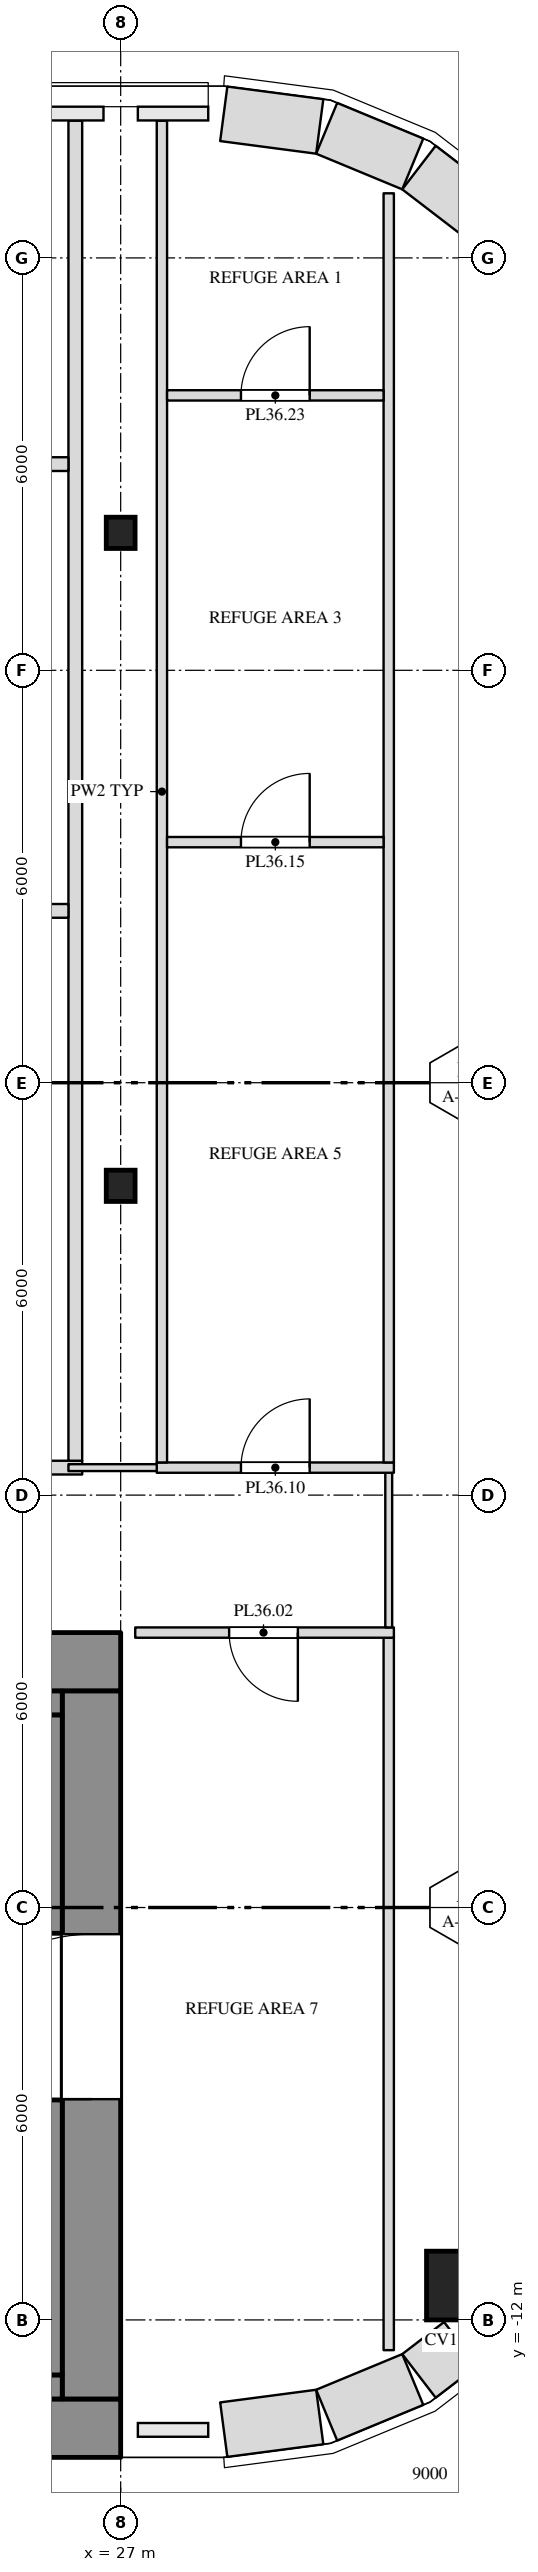
"""IFC4 building model, lengths in metres.
Left out: names, types, materials, properties, quantities, classifications, styles, units other than length and angle.
Written with IfcOpenShell. Run it as: python <this file> out.ifc"""

import sys

from ifc_helpers import new_model, si_unit, direction, frame, frame_2d, origin, origin_2d, place, context, subcontext, project, spatial, rectangle, i_section, extrude, element, fill, save


model = new_model("IFC4")
c1 = context("Model", 3, precision=1e-05, world=origin(), true_north=direction((0.0, 1.0)))
c2 = subcontext(c1, "Body", "Model", "MODEL_VIEW")
j1 = project(units=[si_unit("LENGTHUNIT", "METRE"), si_unit("PLANEANGLEUNIT", "RADIAN")], contexts=[c1])
p1 = place(None, origin())
s1 = spatial("IfcSite", under=j1, at=p1, CompositionType="ELEMENT")
p2 = place(p1, origin())
s2 = spatial("IfcBuilding", under=s1, at=p2, CompositionType="ELEMENT")
p3 = place(p2, frame((0.0, 0.0, 160.5)))
s3 = spatial("IfcBuildingStorey", under=s2, at=p3, CompositionType="ELEMENT", Elevation=160.5)
p4 = place(p3, frame((31.95, -11.5, 0.0), z_axis=(0.0, 0.0, 1.0), x_axis=(1.0, 0.0, 0.0)))
e1 = element("IfcColumn", 1, at=p4, inside=s3, PredefinedType="COLUMN", context=c2, shape_type="SweptSolid", body=[
    extrude(rectangle(XDim=1.0, YDim=1.0, at=origin_2d()), origin(), (0.0, 0.0, 1.0), 4.0),
])
for number, where, z_axis, x_axis in (
    (2, (27.0, 4.5, 0.0), (0.0, 0.0, 1.0), (1.0, 0.0, 0.0)),
    (3, (27.0, 14.0, 0.0), (0.0, 0.0, 1.0), (1.0, 0.0, 0.0)),
):
    element("IfcColumn", number, at=place(p3, frame(where, z_axis=z_axis, x_axis=x_axis)), inside=s3, PredefinedType="COLUMN", context=c2, shape_type="SweptSolid", body=[
        extrude(i_section(OverallWidth=0.419, OverallDepth=0.455, WebThickness=0.042, FlangeThickness=0.068, at=origin_2d()), origin(), (0.0, 0.0, 1.0), 4.0),
    ])
p5 = place(p3, frame((-27.0, -2.425, 0.0), z_axis=(0.0, 0.0, 1.0), x_axis=(1.0, 0.0, 0.0)))
e4 = element("IfcWall", 4, at=p5, inside=s3, PredefinedType="SHEAR", context=c2, shape_type="SweptSolid", body=[
    extrude(rectangle(XDim=54.0, YDim=0.85, at=frame_2d((27.0, 0.0))), origin(), (0.0, 0.0, 1.0), 3.8),
])
p6 = place(p5, frame((15.15, 0.0, 0.0)))
e5 = element("IfcOpeningElement", 5, at=p6, cuts=e4, PredefinedType="OPENING", context=c2, shape_type="SweptSolid", body=[
    extrude(rectangle(XDim=2.4, YDim=2.1, at=frame_2d((1.2, 1.05))), frame((0.0, 0.437, 0.0), z_axis=(0.0, -1.0, 0.0), x_axis=(1.0, 0.0, 0.0)), (0.0, 0.0, 1.0), 0.874),
])
p7 = place(p5, frame((36.45, 0.0, 0.0)))
e6 = element("IfcOpeningElement", 6, at=p7, cuts=e4, PredefinedType="OPENING", context=c2, shape_type="SweptSolid", body=[
    extrude(rectangle(XDim=2.4, YDim=2.1, at=frame_2d((1.2, 1.05))), frame((0.0, 0.437, 0.0), z_axis=(0.0, -1.0, 0.0), x_axis=(1.0, 0.0, 0.0)), (0.0, 0.0, 1.0), 0.874),
])
p8 = place(p3, frame((-27.0, -13.575, 0.0), z_axis=(0.0, 0.0, 1.0), x_axis=(1.0, 0.0, 0.0)))
e7 = element("IfcWall", 7, at=p8, inside=s3, PredefinedType="SHEAR", context=c2, shape_type="SweptSolid", body=[
    extrude(rectangle(XDim=54.0, YDim=0.85, at=frame_2d((27.0, 0.0))), origin(), (0.0, 0.0, 1.0), 3.8),
])
p9 = place(p3, frame((26.575, -13.15, 0.0), z_axis=(0.0, 0.0, 1.0), x_axis=(0.0, 1.0, 0.0)))
e8 = element("IfcWall", 8, at=p9, inside=s3, PredefinedType="SHEAR", context=c2, shape_type="SweptSolid", body=[
    extrude(rectangle(XDim=10.3, YDim=0.85, at=frame_2d((5.15, 0.0))), origin(), (0.0, 0.0, 1.0), 3.8),
])
p10 = place(p9, frame((4.362, 0.0, 0.0)))
e9 = element("IfcOpeningElement", 9, at=p10, cuts=e8, PredefinedType="OPENING", context=c2, shape_type="SweptSolid", body=[
    extrude(rectangle(XDim=2.4, YDim=2.1, at=frame_2d((1.2, 1.05))), frame((0.0, 0.437, 0.0), z_axis=(0.0, -1.0, 0.0), x_axis=(1.0, 0.0, 0.0)), (0.0, 0.0, 1.0), 0.874),
])
p11 = place(p3, frame((12.0, -3.025, 0.0), z_axis=(0.0, 0.0, 1.0), x_axis=(1.0, 0.0, 0.0)))
e10 = element("IfcWall", 10, at=p11, inside=s3, PredefinedType="SHEAR", context=c2, shape_type="SweptSolid", body=[
    extrude(rectangle(XDim=14.15, YDim=0.35, at=frame_2d((7.075, 0.0))), origin(), (0.0, 0.0, 1.0), 3.8),
])
p12 = place(p3, frame((-26.15, -12.975, 0.0), z_axis=(0.0, 0.0, 1.0), x_axis=(1.0, 0.0, 0.0)))
e11 = element("IfcWall", 11, at=p12, inside=s3, PredefinedType="SHEAR", context=c2, shape_type="SweptSolid", body=[
    extrude(rectangle(XDim=52.3, YDim=0.35, at=frame_2d((26.15, 0.0))), origin(), (0.0, 0.0, 1.0), 3.8),
])
p13 = place(p3, frame((25.975, -12.8, 0.0), z_axis=(0.0, 0.0, 1.0), x_axis=(0.0, 1.0, 0.0)))
e12 = element("IfcWall", 12, at=p13, inside=s3, PredefinedType="SHEAR", context=c2, shape_type="SweptSolid", body=[
    extrude(rectangle(XDim=4.0, YDim=0.35, at=frame_2d((2.0, 0.0))), origin(), (0.0, 0.0, 1.0), 3.8),
])
p14 = place(p3, frame((25.975, -6.375, 0.0), z_axis=(0.0, 0.0, 1.0), x_axis=(0.0, 1.0, 0.0)))
e13 = element("IfcWall", 13, at=p14, inside=s3, PredefinedType="SHEAR", context=c2, shape_type="SweptSolid", body=[
    extrude(rectangle(XDim=3.175, YDim=0.35, at=frame_2d((1.587, 0.0))), origin(), (0.0, 0.0, 1.0), 3.8),
])
p15 = place(p3, frame((30.9, -12.44, 0.0), z_axis=(0.0, 0.0, 1.0), x_axis=(0.0, 1.0, 0.0)))
e14 = element("IfcWall", 14, at=p15, inside=s3, PredefinedType="PARTITIONING", context=c2, shape_type="SweptSolid", body=[
    extrude(rectangle(XDim=10.365, YDim=0.15, at=frame_2d((5.183, 0.0))), origin(), (0.0, 0.0, 1.0), 3.8),
])
p16 = place(p3, frame((27.212, -2.0, 0.0), z_axis=(0.0, 0.0, 1.0), x_axis=(1.0, 0.0, 0.0)))
e15 = element("IfcWall", 15, at=p16, inside=s3, PredefinedType="PARTITIONING", context=c2, shape_type="SweptSolid", body=[
    extrude(rectangle(XDim=3.763, YDim=0.15, at=frame_2d((1.882, 0.0))), origin(), (0.0, 0.0, 1.0), 3.8),
])
p17 = place(p16, frame((1.366, 0.0, 0.0)))
e16 = element("IfcOpeningElement", 16, at=p17, cuts=e15, PredefinedType="OPENING", context=c2, shape_type="SweptSolid", body=[
    extrude(rectangle(XDim=1.0, YDim=2.1, at=frame_2d((0.5, 1.05))), frame((0.0, 0.087, 0.0), z_axis=(0.0, -1.0, 0.0), x_axis=(1.0, 0.0, 0.0)), (0.0, 0.0, 1.0), 0.174),
])
p18 = place(p3, frame((30.9, -1.925, 0.0), z_axis=(0.0, 0.0, 1.0), x_axis=(0.0, 1.0, 0.0)))
e17 = element("IfcWall", 17, at=p18, inside=s3, PredefinedType="PARTITIONING", context=c2, shape_type="SweptSolid", body=[
    extrude(rectangle(XDim=2.25, YDim=0.1, at=frame_2d((1.125, 0.0))), origin(), (0.0, 0.0, 1.0), 3.8),
])
p19 = place(p3, frame((18.56, 0.4, 0.0), z_axis=(0.0, 0.0, 1.0), x_axis=(1.0, 0.0, 0.0)))
e18 = element("IfcWall", 18, at=p19, inside=s3, PredefinedType="PARTITIONING", context=c2, shape_type="SweptSolid", body=[
    extrude(rectangle(XDim=7.88, YDim=0.2, at=frame_2d((3.94, 0.0))), origin(), (0.0, 0.0, 1.0), 3.8),
])
p20 = place(p19, frame((3.05, 0.0, 0.0)))
e19 = element("IfcOpeningElement", 19, at=p20, cuts=e18, PredefinedType="OPENING", context=c2, shape_type="SweptSolid", body=[
    extrude(rectangle(XDim=1.8, YDim=2.1, at=frame_2d((0.9, 1.05))), frame((0.0, 0.112, 0.0), z_axis=(0.0, -1.0, 0.0), x_axis=(1.0, 0.0, 0.0)), (0.0, 0.0, 1.0), 0.224),
])
p21 = place(p3, frame((26.24, 0.4, 0.0), z_axis=(0.0, 0.0, 1.0), x_axis=(1.0, 0.0, 0.0)))
e20 = element("IfcWall", 20, at=p21, inside=s3, PredefinedType="PARTITIONING", context=c2, shape_type="SweptSolid", body=[
    extrude(rectangle(XDim=1.435, YDim=0.1, at=frame_2d((0.718, 0.0))), origin(), (0.0, 0.0, 1.0), 3.8),
])
p22 = place(p3, frame((26.34, 0.5, 0.0), z_axis=(0.0, 0.0, 1.0), x_axis=(0.0, 1.0, 0.0)))
e21 = element("IfcWall", 21, at=p22, inside=s3, PredefinedType="PARTITIONING", context=c2, shape_type="SweptSolid", body=[
    extrude(rectangle(XDim=19.496, YDim=0.2, at=frame_2d((9.748, 0.0))), origin(), (0.0, 0.0, 1.0), 3.8),
])
p23 = place(p3, frame((27.525, 0.4, 0.0), z_axis=(0.0, 0.0, 1.0), x_axis=(1.0, 0.0, 0.0)))
e22 = element("IfcWall", 22, at=p23, inside=s3, PredefinedType="PARTITIONING", context=c2, shape_type="SweptSolid", body=[
    extrude(rectangle(XDim=3.45, YDim=0.15, at=frame_2d((1.725, 0.0))), origin(), (0.0, 0.0, 1.0), 3.8),
])
p24 = place(p23, frame((1.225, 0.0, 0.0)))
e23 = element("IfcOpeningElement", 23, at=p24, cuts=e22, PredefinedType="OPENING", context=c2, shape_type="SweptSolid", body=[
    extrude(rectangle(XDim=1.0, YDim=2.1, at=frame_2d((0.5, 1.05))), frame((0.0, 0.087, 0.0), z_axis=(0.0, -1.0, 0.0), x_axis=(1.0, 0.0, 0.0)), (0.0, 0.0, 1.0), 0.174),
])
p25 = place(p3, frame((27.6, 0.475, 0.0), z_axis=(0.0, 0.0, 1.0), x_axis=(0.0, 1.0, 0.0)))
e24 = element("IfcWall", 24, at=p25, inside=s3, PredefinedType="PARTITIONING", context=c2, shape_type="SweptSolid", body=[
    extrude(rectangle(XDim=19.521, YDim=0.15, at=frame_2d((9.76, 0.0))), origin(), (0.0, 0.0, 1.0), 3.8),
])
p26 = place(p3, frame((30.9, 0.475, 0.0), z_axis=(0.0, 0.0, 1.0), x_axis=(0.0, 1.0, 0.0)))
e25 = element("IfcWall", 25, at=p26, inside=s3, PredefinedType="PARTITIONING", context=c2, shape_type="SweptSolid", body=[
    extrude(rectangle(XDim=18.465, YDim=0.15, at=frame_2d((9.232, 0.0))), origin(), (0.0, 0.0, 1.0), 3.8),
])
p27 = place(p3, frame((18.76, 8.5, 0.0), z_axis=(0.0, 0.0, 1.0), x_axis=(1.0, 0.0, 0.0)))
e26 = element("IfcWall", 26, at=p27, inside=s3, PredefinedType="PARTITIONING", context=c2, shape_type="SweptSolid", body=[
    extrude(rectangle(XDim=7.48, YDim=0.2, at=frame_2d((3.74, 0.0))), origin(), (0.0, 0.0, 1.0), 3.8),
])
p28 = place(p27, frame((3.25, 0.0, 0.0)))
e27 = element("IfcOpeningElement", 27, at=p28, cuts=e26, PredefinedType="OPENING", context=c2, shape_type="SweptSolid", body=[
    extrude(rectangle(XDim=1.0, YDim=2.1, at=frame_2d((0.5, 1.05))), frame((0.0, 0.112, 0.0), z_axis=(0.0, -1.0, 0.0), x_axis=(1.0, 0.0, 0.0)), (0.0, 0.0, 1.0), 0.224),
])
p29 = place(p3, frame((27.675, 9.5, 0.0), z_axis=(0.0, 0.0, 1.0), x_axis=(1.0, 0.0, 0.0)))
e28 = element("IfcWall", 28, at=p29, inside=s3, PredefinedType="PARTITIONING", context=c2, shape_type="SweptSolid", body=[
    extrude(rectangle(XDim=3.15, YDim=0.15, at=frame_2d((1.575, 0.0))), origin(), (0.0, 0.0, 1.0), 3.8),
])
p30 = place(p29, frame((1.075, 0.0, 0.0)))
e29 = element("IfcOpeningElement", 29, at=p30, cuts=e28, PredefinedType="OPENING", context=c2, shape_type="SweptSolid", body=[
    extrude(rectangle(XDim=1.0, YDim=2.1, at=frame_2d((0.5, 1.05))), frame((0.0, 0.087, 0.0), z_axis=(0.0, -1.0, 0.0), x_axis=(1.0, 0.0, 0.0)), (0.0, 0.0, 1.0), 0.174),
])
p31 = place(p3, frame((18.76, 15.0, 0.0), z_axis=(0.0, 0.0, 1.0), x_axis=(1.0, 0.0, 0.0)))
e30 = element("IfcWall", 30, at=p31, inside=s3, PredefinedType="PARTITIONING", context=c2, shape_type="SweptSolid", body=[
    extrude(rectangle(XDim=7.48, YDim=0.2, at=frame_2d((3.74, 0.0))), origin(), (0.0, 0.0, 1.0), 3.8),
])
p32 = place(p31, frame((3.25, 0.0, 0.0)))
e31 = element("IfcOpeningElement", 31, at=p32, cuts=e30, PredefinedType="OPENING", context=c2, shape_type="SweptSolid", body=[
    extrude(rectangle(XDim=1.0, YDim=2.1, at=frame_2d((0.5, 1.05))), frame((0.0, 0.112, 0.0), z_axis=(0.0, -1.0, 0.0), x_axis=(1.0, 0.0, 0.0)), (0.0, 0.0, 1.0), 0.224),
])
p33 = place(p3, frame((27.675, 16.0, 0.0), z_axis=(0.0, 0.0, 1.0), x_axis=(1.0, 0.0, 0.0)))
e32 = element("IfcWall", 32, at=p33, inside=s3, PredefinedType="PARTITIONING", context=c2, shape_type="SweptSolid", body=[
    extrude(rectangle(XDim=3.15, YDim=0.15, at=frame_2d((1.575, 0.0))), origin(), (0.0, 0.0, 1.0), 3.8),
])
p34 = place(p33, frame((1.075, 0.0, 0.0)))
e33 = element("IfcOpeningElement", 33, at=p34, cuts=e32, PredefinedType="OPENING", context=c2, shape_type="SweptSolid", body=[
    extrude(rectangle(XDim=1.0, YDim=2.1, at=frame_2d((0.5, 1.05))), frame((0.0, 0.087, 0.0), z_axis=(0.0, -1.0, 0.0), x_axis=(1.0, 0.0, 0.0)), (0.0, 0.0, 1.0), 0.174),
])
p35 = place(p3, frame((28.5, -13.597, 0.0), z_axis=(0.0, 0.0, 1.0), x_axis=(0.99144603414, 0.130517283865, 0.0)))
e34 = element("IfcWall", 34, at=p35, inside=s3, PredefinedType="SOLIDWALL", context=c2, shape_type="SweptSolid", body=[
    extrude(rectangle(XDim=1.408, YDim=0.8, at=frame_2d((0.704, 0.0))), origin(), (0.0, 0.0, 1.0), 3.8),
])
p36 = place(p3, frame((29.997, -13.386, 0.0), z_axis=(0.0, 0.0, 1.0), x_axis=(0.923847774587, 0.38276009378, 0.0)))
e35 = element("IfcWall", 35, at=p36, inside=s3, PredefinedType="SOLIDWALL", context=c2, shape_type="SweptSolid", body=[
    extrude(rectangle(XDim=1.355, YDim=0.8, at=frame_2d((0.678, 0.0))), origin(), (0.0, 0.0, 1.0), 3.8),
])
p37 = place(p3, frame((31.34, -12.815, 0.0), z_axis=(0.0, 0.0, 1.0), x_axis=(0.793380840338, 0.608725588574, 0.0)))
e36 = element("IfcWall", 36, at=p37, inside=s3, PredefinedType="SOLIDWALL", context=c2, shape_type="SweptSolid", body=[
    extrude(rectangle(XDim=0.767, YDim=0.8, at=frame_2d((0.383, 0.0))), origin(), (0.0, 0.0, 1.0), 3.8),
])
p38 = place(p3, frame((32.416, 18.489, 0.0), z_axis=(0.0, 0.0, 1.0), x_axis=(-0.793272915452, 0.608866226366, 0.0)))
e37 = element("IfcWall", 37, at=p38, inside=s3, PredefinedType="SOLIDWALL", context=c2, shape_type="SweptSolid", body=[
    extrude(rectangle(XDim=1.356, YDim=0.8, at=frame_2d((0.678, 0.0))), origin(), (0.0, 0.0, 1.0), 3.8),
])
p39 = place(p3, frame((31.25, 19.367, 0.0), z_axis=(0.0, 0.0, 1.0), x_axis=(-0.923847774587, 0.38276009378, 0.0)))
e38 = element("IfcWall", 38, at=p39, inside=s3, PredefinedType="SOLIDWALL", context=c2, shape_type="SweptSolid", body=[
    extrude(rectangle(XDim=1.355, YDim=0.8, at=frame_2d((0.678, 0.0))), origin(), (0.0, 0.0, 1.0), 3.8),
])
p40 = place(p3, frame((29.896, 19.913, 0.0), z_axis=(0.0, 0.0, 1.0), x_axis=(-0.99144603414, 0.130517283865, 0.0)))
e39 = element("IfcWall", 39, at=p40, inside=s3, PredefinedType="SOLIDWALL", context=c2, shape_type="SweptSolid", body=[
    extrude(rectangle(XDim=1.408, YDim=0.8, at=frame_2d((0.704, 0.0))), origin(), (0.0, 0.0, 1.0), 3.8),
])
p41 = place(p17, origin())
e40 = element("IfcDoor", 40, at=p41, inside=s3, OperationType="SINGLE_SWING_LEFT", PredefinedType="DOOR", context=c2, shape_type="SweptSolid", body=[
    extrude(rectangle(XDim=1.0, YDim=2.1, at=frame_2d((0.5, 1.05))), frame((0.0, 0.025, 0.0), z_axis=(0.0, -1.0, 0.0), x_axis=(1.0, 0.0, 0.0)), (0.0, 0.0, 1.0), 0.05),
])
fill(e16, e40)
p42 = place(p24, origin())
e41 = element("IfcDoor", 41, at=p42, inside=s3, OperationType="SINGLE_SWING_RIGHT", PredefinedType="DOOR", context=c2, shape_type="SweptSolid", body=[
    extrude(rectangle(XDim=1.0, YDim=2.1, at=frame_2d((0.5, 1.05))), frame((0.0, 0.025, 0.0), z_axis=(0.0, -1.0, 0.0), x_axis=(1.0, 0.0, 0.0)), (0.0, 0.0, 1.0), 0.05),
])
fill(e23, e41)
p43 = place(p30, origin())
e42 = element("IfcDoor", 42, at=p43, inside=s3, OperationType="SINGLE_SWING_RIGHT", PredefinedType="DOOR", context=c2, shape_type="SweptSolid", body=[
    extrude(rectangle(XDim=1.0, YDim=2.1, at=frame_2d((0.5, 1.05))), frame((0.0, 0.025, 0.0), z_axis=(0.0, -1.0, 0.0), x_axis=(1.0, 0.0, 0.0)), (0.0, 0.0, 1.0), 0.05),
])
fill(e29, e42)
p44 = place(p34, origin())
e43 = element("IfcDoor", 43, at=p44, inside=s3, OperationType="SINGLE_SWING_RIGHT", PredefinedType="DOOR", context=c2, shape_type="SweptSolid", body=[
    extrude(rectangle(XDim=1.0, YDim=2.1, at=frame_2d((0.5, 1.05))), frame((0.0, 0.025, 0.0), z_axis=(0.0, -1.0, 0.0), x_axis=(1.0, 0.0, 0.0)), (0.0, 0.0, 1.0), 0.05),
])
fill(e33, e43)
p45 = place(p10, origin())
e44 = element("IfcDoor", 44, at=p45, inside=s3, OperationType="DOUBLE_DOOR_SINGLE_SWING", PredefinedType="DOOR", context=c2, shape_type="SweptSolid", body=[
    extrude(rectangle(XDim=2.4, YDim=2.1, at=frame_2d((1.2, 1.05))), frame((0.0, 0.025, 0.0), z_axis=(0.0, -1.0, 0.0), x_axis=(1.0, 0.0, 0.0)), (0.0, 0.0, 1.0), 0.05),
])
fill(e9, e44)
save(model, sys.argv[1])
